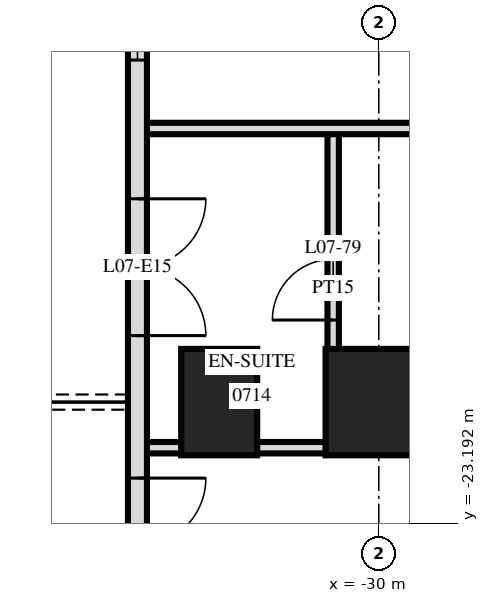
"""IFC4 building model, lengths in metres.
Left out: names, types, materials, properties, quantities, classifications, styles, units other than length and angle.
Written with IfcOpenShell. Run it as: python <this file> out.ifc"""

import sys

from ifc_helpers import new_model, si_unit, direction, frame, frame_2d, origin, origin_2d, place, context, subcontext, project, spatial, rectangle, extrude, element, fill, save


model = new_model("IFC4")
c1 = context("Model", 3, precision=1e-05, world=origin(), true_north=direction((0.0, 1.0)))
c2 = subcontext(c1, "Body", "Model", "MODEL_VIEW")
j1 = project(units=[si_unit("LENGTHUNIT", "METRE"), si_unit("PLANEANGLEUNIT", "RADIAN")], contexts=[c1])
p1 = place(None, origin())
s1 = spatial("IfcSite", under=j1, at=p1, CompositionType="ELEMENT")
p2 = place(p1, origin())
s2 = spatial("IfcBuilding", under=s1, at=p2, CompositionType="ELEMENT")
p3 = place(p2, frame((0.0, 0.0, 34.8)))
s3 = spatial("IfcBuildingStorey", under=s2, at=p3, CompositionType="ELEMENT", Elevation=34.8)
p4 = place(p3, frame((-32.1, -21.6, 0.0), z_axis=(0.0, 0.0, 1.0), x_axis=(0.0, 1.0, 0.0)))
e1 = element("IfcColumn", 1, at=p4, inside=s3, PredefinedType="COLUMN", context=c2, shape_type="SweptSolid", body=[
    extrude(rectangle(XDim=1.4, YDim=1.0, at=origin_2d()), origin(), (0.0, 0.0, 1.0), 3.6),
])
p5 = place(p3, frame((-30.0, -21.6, 0.0), z_axis=(0.0, 0.0, 1.0), x_axis=(1.0, 0.0, 0.0)))
e2 = element("IfcColumn", 2, at=p5, inside=s3, PredefinedType="COLUMN", context=c2, shape_type="SweptSolid", body=[
    extrude(rectangle(XDim=1.4, YDim=1.4, at=origin_2d()), origin(), (0.0, 0.0, 1.0), 3.6),
])
p6 = place(p3, frame((-33.175, -3.325, 0.0), z_axis=(0.0, 0.0, 1.0), x_axis=(0.0, -1.0, 0.0)))
e3 = element("IfcWall", 3, at=p6, inside=s3, PredefinedType="SOLIDWALL", context=c2, shape_type="SweptSolid", body=[
    extrude(rectangle(XDim=21.551, YDim=0.25, at=frame_2d((10.775, 0.0))), origin(), (0.0, 0.0, 1.0), 3.32),
])
p7 = place(p6, frame((6.575, 0.0, 0.0)))
e4 = element("IfcOpeningElement", 4, at=p7, cuts=e3, PredefinedType="OPENING", context=c2, shape_type="SweptSolid", body=[
    extrude(rectangle(XDim=1.8, YDim=2.4, at=frame_2d((0.9, 1.2))), frame((0.0, 0.135, 0.0), z_axis=(0.0, -1.0, 0.0), x_axis=(1.0, 0.0, 0.0)), (0.0, 0.0, 1.0), 0.27),
])
p8 = place(p6, frame((9.425, 0.0, 0.3)))
e5 = element("IfcOpeningElement", 5, at=p8, cuts=e3, PredefinedType="OPENING", context=c2, shape_type="SweptSolid", body=[
    extrude(rectangle(XDim=1.8, YDim=2.1, at=frame_2d((0.9, 1.05))), frame((0.0, 0.135, 0.0), z_axis=(0.0, -1.0, 0.0), x_axis=(1.0, 0.0, 0.0)), (0.0, 0.0, 1.0), 0.27),
])
p9 = place(p6, frame((12.575, 0.0, 0.3)))
e6 = element("IfcOpeningElement", 6, at=p9, cuts=e3, PredefinedType="OPENING", context=c2, shape_type="SweptSolid", body=[
    extrude(rectangle(XDim=1.2, YDim=2.1, at=frame_2d((0.6, 1.05))), frame((0.0, 0.135, 0.0), z_axis=(0.0, -1.0, 0.0), x_axis=(1.0, 0.0, 0.0)), (0.0, 0.0, 1.0), 0.27),
])
p10 = place(p6, frame((15.6, 0.0, 0.0)))
e7 = element("IfcOpeningElement", 7, at=p10, cuts=e3, PredefinedType="OPENING", context=c2, shape_type="SweptSolid", body=[
    extrude(rectangle(XDim=1.8, YDim=2.4, at=frame_2d((0.9, 1.2))), frame((0.0, 0.135, 0.0), z_axis=(0.0, -1.0, 0.0), x_axis=(1.0, 0.0, 0.0)), (0.0, 0.0, 1.0), 0.27),
])
p11 = place(p6, frame((19.275, 0.0, 0.0)))
e8 = element("IfcOpeningElement", 8, at=p11, cuts=e3, PredefinedType="OPENING", context=c2, shape_type="SweptSolid", body=[
    extrude(rectangle(XDim=1.8, YDim=2.4, at=frame_2d((0.9, 1.2))), frame((0.0, 0.135, 0.0), z_axis=(0.0, -1.0, 0.0), x_axis=(1.0, 0.0, 0.0)), (0.0, 0.0, 1.0), 0.27),
])
p12 = place(p3, frame((-30.6, -22.2, 0.0), z_axis=(0.0, 0.0, 1.0), x_axis=(0.0, 1.0, 0.0)))
e9 = element("IfcWall", 9, at=p12, inside=s3, PredefinedType="PARTITIONING", context=c2, shape_type="SweptSolid", body=[
    extrude(rectangle(XDim=4.2, YDim=0.15, at=frame_2d((2.1, 0.0))), origin(), (0.0, 0.0, 1.0), 3.32),
])
p13 = place(p12, frame((1.68, 0.0, 0.0)))
e10 = element("IfcOpeningElement", 10, at=p13, cuts=e9, PredefinedType="OPENING", context=c2, shape_type="SweptSolid", body=[
    extrude(rectangle(XDim=0.8, YDim=2.1, at=frame_2d((0.4, 1.05))), frame((0.0, 0.085, 0.0), z_axis=(0.0, -1.0, 0.0), x_axis=(1.0, 0.0, 0.0)), (0.0, 0.0, 1.0), 0.17),
])
p14 = place(p3, frame((-33.12, -22.2, 0.0), z_axis=(0.0, 0.0, 1.0), x_axis=(1.0, 0.0, 0.0)))
e11 = element("IfcWall", 11, at=p14, inside=s3, PredefinedType="PARTITIONING", context=c2, shape_type="SweptSolid", body=[
    extrude(rectangle(XDim=2.52, YDim=0.15, at=frame_2d((1.26, 0.0))), origin(), (0.0, 0.0, 1.0), 3.32),
])
p15 = place(p3, frame((-33.12, -18.0, 0.0), z_axis=(0.0, 0.0, 1.0), x_axis=(1.0, 0.0, 0.0)))
e12 = element("IfcWall", 12, at=p15, inside=s3, PredefinedType="PARTITIONING", context=c2, shape_type="SweptSolid", body=[
    extrude(rectangle(XDim=66.24, YDim=0.15, at=frame_2d((33.12, 0.0))), origin(), (0.0, 0.0, 1.0), 3.32),
])
p16 = place(p15, frame((12.27, 0.0, 0.0)))
e13 = element("IfcOpeningElement", 13, at=p16, cuts=e12, PredefinedType="OPENING", context=c2, shape_type="SweptSolid", body=[
    extrude(rectangle(XDim=1.0, YDim=2.1, at=frame_2d((0.5, 1.05))), frame((0.0, 0.085, 0.0), z_axis=(0.0, -1.0, 0.0), x_axis=(1.0, 0.0, 0.0)), (0.0, 0.0, 1.0), 0.17),
])
p17 = place(p15, frame((16.97, 0.0, 0.0)))
e14 = element("IfcOpeningElement", 14, at=p17, cuts=e12, PredefinedType="OPENING", context=c2, shape_type="SweptSolid", body=[
    extrude(rectangle(XDim=1.0, YDim=2.1, at=frame_2d((0.5, 1.05))), frame((0.0, 0.085, 0.0), z_axis=(0.0, -1.0, 0.0), x_axis=(1.0, 0.0, 0.0)), (0.0, 0.0, 1.0), 0.17),
])
p18 = place(p15, frame((18.27, 0.0, 0.0)))
e15 = element("IfcOpeningElement", 15, at=p18, cuts=e12, PredefinedType="OPENING", context=c2, shape_type="SweptSolid", body=[
    extrude(rectangle(XDim=1.0, YDim=2.1, at=frame_2d((0.5, 1.05))), frame((0.0, 0.085, 0.0), z_axis=(0.0, -1.0, 0.0), x_axis=(1.0, 0.0, 0.0)), (0.0, 0.0, 1.0), 0.17),
])
p19 = place(p15, frame((22.97, 0.0, 0.0)))
e16 = element("IfcOpeningElement", 16, at=p19, cuts=e12, PredefinedType="OPENING", context=c2, shape_type="SweptSolid", body=[
    extrude(rectangle(XDim=1.0, YDim=2.1, at=frame_2d((0.5, 1.05))), frame((0.0, 0.085, 0.0), z_axis=(0.0, -1.0, 0.0), x_axis=(1.0, 0.0, 0.0)), (0.0, 0.0, 1.0), 0.17),
])
p20 = place(p15, frame((24.27, 0.0, 0.0)))
e17 = element("IfcOpeningElement", 17, at=p20, cuts=e12, PredefinedType="OPENING", context=c2, shape_type="SweptSolid", body=[
    extrude(rectangle(XDim=1.0, YDim=2.1, at=frame_2d((0.5, 1.05))), frame((0.0, 0.085, 0.0), z_axis=(0.0, -1.0, 0.0), x_axis=(1.0, 0.0, 0.0)), (0.0, 0.0, 1.0), 0.17),
])
p21 = place(p15, frame((28.97, 0.0, 0.0)))
e18 = element("IfcOpeningElement", 18, at=p21, cuts=e12, PredefinedType="OPENING", context=c2, shape_type="SweptSolid", body=[
    extrude(rectangle(XDim=1.0, YDim=2.1, at=frame_2d((0.5, 1.05))), frame((0.0, 0.085, 0.0), z_axis=(0.0, -1.0, 0.0), x_axis=(1.0, 0.0, 0.0)), (0.0, 0.0, 1.0), 0.17),
])
p22 = place(p15, frame((30.27, 0.0, 0.0)))
e19 = element("IfcOpeningElement", 19, at=p22, cuts=e12, PredefinedType="OPENING", context=c2, shape_type="SweptSolid", body=[
    extrude(rectangle(XDim=1.0, YDim=2.1, at=frame_2d((0.5, 1.05))), frame((0.0, 0.085, 0.0), z_axis=(0.0, -1.0, 0.0), x_axis=(1.0, 0.0, 0.0)), (0.0, 0.0, 1.0), 0.17),
])
p23 = place(p15, frame((34.97, 0.0, 0.0)))
e20 = element("IfcOpeningElement", 20, at=p23, cuts=e12, PredefinedType="OPENING", context=c2, shape_type="SweptSolid", body=[
    extrude(rectangle(XDim=1.0, YDim=2.1, at=frame_2d((0.5, 1.05))), frame((0.0, 0.085, 0.0), z_axis=(0.0, -1.0, 0.0), x_axis=(1.0, 0.0, 0.0)), (0.0, 0.0, 1.0), 0.17),
])
p24 = place(p15, frame((37.27, 0.0, 0.0)))
e21 = element("IfcOpeningElement", 21, at=p24, cuts=e12, PredefinedType="OPENING", context=c2, shape_type="SweptSolid", body=[
    extrude(rectangle(XDim=1.0, YDim=2.1, at=frame_2d((0.5, 1.05))), frame((0.0, 0.085, 0.0), z_axis=(0.0, -1.0, 0.0), x_axis=(1.0, 0.0, 0.0)), (0.0, 0.0, 1.0), 0.17),
])
p25 = place(p15, frame((43.97, 0.0, 0.0)))
e22 = element("IfcOpeningElement", 22, at=p25, cuts=e12, PredefinedType="OPENING", context=c2, shape_type="SweptSolid", body=[
    extrude(rectangle(XDim=1.0, YDim=2.1, at=frame_2d((0.5, 1.05))), frame((0.0, 0.085, 0.0), z_axis=(0.0, -1.0, 0.0), x_axis=(1.0, 0.0, 0.0)), (0.0, 0.0, 1.0), 0.17),
])
p26 = place(p15, frame((45.27, 0.0, 0.0)))
e23 = element("IfcOpeningElement", 23, at=p26, cuts=e12, PredefinedType="OPENING", context=c2, shape_type="SweptSolid", body=[
    extrude(rectangle(XDim=1.0, YDim=2.1, at=frame_2d((0.5, 1.05))), frame((0.0, 0.085, 0.0), z_axis=(0.0, -1.0, 0.0), x_axis=(1.0, 0.0, 0.0)), (0.0, 0.0, 1.0), 0.17),
])
p27 = place(p15, frame((51.22, 0.0, 0.0)))
e24 = element("IfcOpeningElement", 24, at=p27, cuts=e12, PredefinedType="OPENING", context=c2, shape_type="SweptSolid", body=[
    extrude(rectangle(XDim=1.0, YDim=2.1, at=frame_2d((0.5, 1.05))), frame((0.0, 0.085, 0.0), z_axis=(0.0, -1.0, 0.0), x_axis=(1.0, 0.0, 0.0)), (0.0, 0.0, 1.0), 0.17),
])
p28 = place(p15, frame((54.27, 0.0, 0.0)))
e25 = element("IfcOpeningElement", 25, at=p28, cuts=e12, PredefinedType="OPENING", context=c2, shape_type="SweptSolid", body=[
    extrude(rectangle(XDim=1.0, YDim=2.1, at=frame_2d((0.5, 1.05))), frame((0.0, 0.085, 0.0), z_axis=(0.0, -1.0, 0.0), x_axis=(1.0, 0.0, 0.0)), (0.0, 0.0, 1.0), 0.17),
])
p29 = place(p15, frame((6.07, 0.0, 0.0)))
e26 = element("IfcOpeningElement", 26, at=p29, cuts=e12, PredefinedType="OPENING", context=c2, shape_type="SweptSolid", body=[
    extrude(rectangle(XDim=1.0, YDim=2.1, at=frame_2d((0.5, 1.05))), frame((0.0, 0.085, 0.0), z_axis=(0.0, -1.0, 0.0), x_axis=(1.0, 0.0, 0.0)), (0.0, 0.0, 1.0), 0.17),
])
p30 = place(p15, frame((63.37, 0.0, 0.0)))
e27 = element("IfcOpeningElement", 27, at=p30, cuts=e12, PredefinedType="OPENING", context=c2, shape_type="SweptSolid", body=[
    extrude(rectangle(XDim=1.0, YDim=2.1, at=frame_2d((0.5, 1.05))), frame((0.0, 0.085, 0.0), z_axis=(0.0, -1.0, 0.0), x_axis=(1.0, 0.0, 0.0)), (0.0, 0.0, 1.0), 0.17),
])
p31 = place(p9, origin())
e28 = element("IfcWindow", 28, at=p31, inside=s3, PartitioningType="SINGLE_PANEL", PredefinedType="WINDOW", context=c2, shape_type="SweptSolid", body=[
    extrude(rectangle(XDim=1.2, YDim=2.1, at=frame_2d((0.6, 1.05))), frame((0.0, 0.03, 0.0), z_axis=(0.0, -1.0, 0.0), x_axis=(1.0, 0.0, 0.0)), (0.0, 0.0, 1.0), 0.06),
])
fill(e6, e28)
p32 = place(p10, origin())
e29 = element("IfcDoor", 29, at=p32, inside=s3, OperationType="DOUBLE_DOOR_SINGLE_SWING", PredefinedType="DOOR", context=c2, shape_type="SweptSolid", body=[
    extrude(rectangle(XDim=1.8, YDim=2.4, at=frame_2d((0.9, 1.2))), frame((0.0, 0.025, 0.0), z_axis=(0.0, -1.0, 0.0), x_axis=(1.0, 0.0, 0.0)), (0.0, 0.0, 1.0), 0.05),
])
fill(e7, e29)
p33 = place(p11, origin())
e30 = element("IfcDoor", 30, at=p33, inside=s3, OperationType="DOUBLE_DOOR_SINGLE_SWING", PredefinedType="DOOR", context=c2, shape_type="SweptSolid", body=[
    extrude(rectangle(XDim=1.8, YDim=2.4, at=frame_2d((0.9, 1.2))), frame((0.0, 0.025, 0.0), z_axis=(0.0, -1.0, 0.0), x_axis=(1.0, 0.0, 0.0)), (0.0, 0.0, 1.0), 0.05),
])
fill(e8, e30)
p34 = place(p13, origin())
e31 = element("IfcDoor", 31, at=p34, inside=s3, OperationType="SINGLE_SWING_RIGHT", PredefinedType="DOOR", context=c2, shape_type="SweptSolid", body=[
    extrude(rectangle(XDim=0.8, YDim=2.1, at=frame_2d((0.4, 1.05))), frame((0.0, 0.025, 0.0), z_axis=(0.0, -1.0, 0.0), x_axis=(1.0, 0.0, 0.0)), (0.0, 0.0, 1.0), 0.05),
])
fill(e10, e31)
save(model, sys.argv[1])
